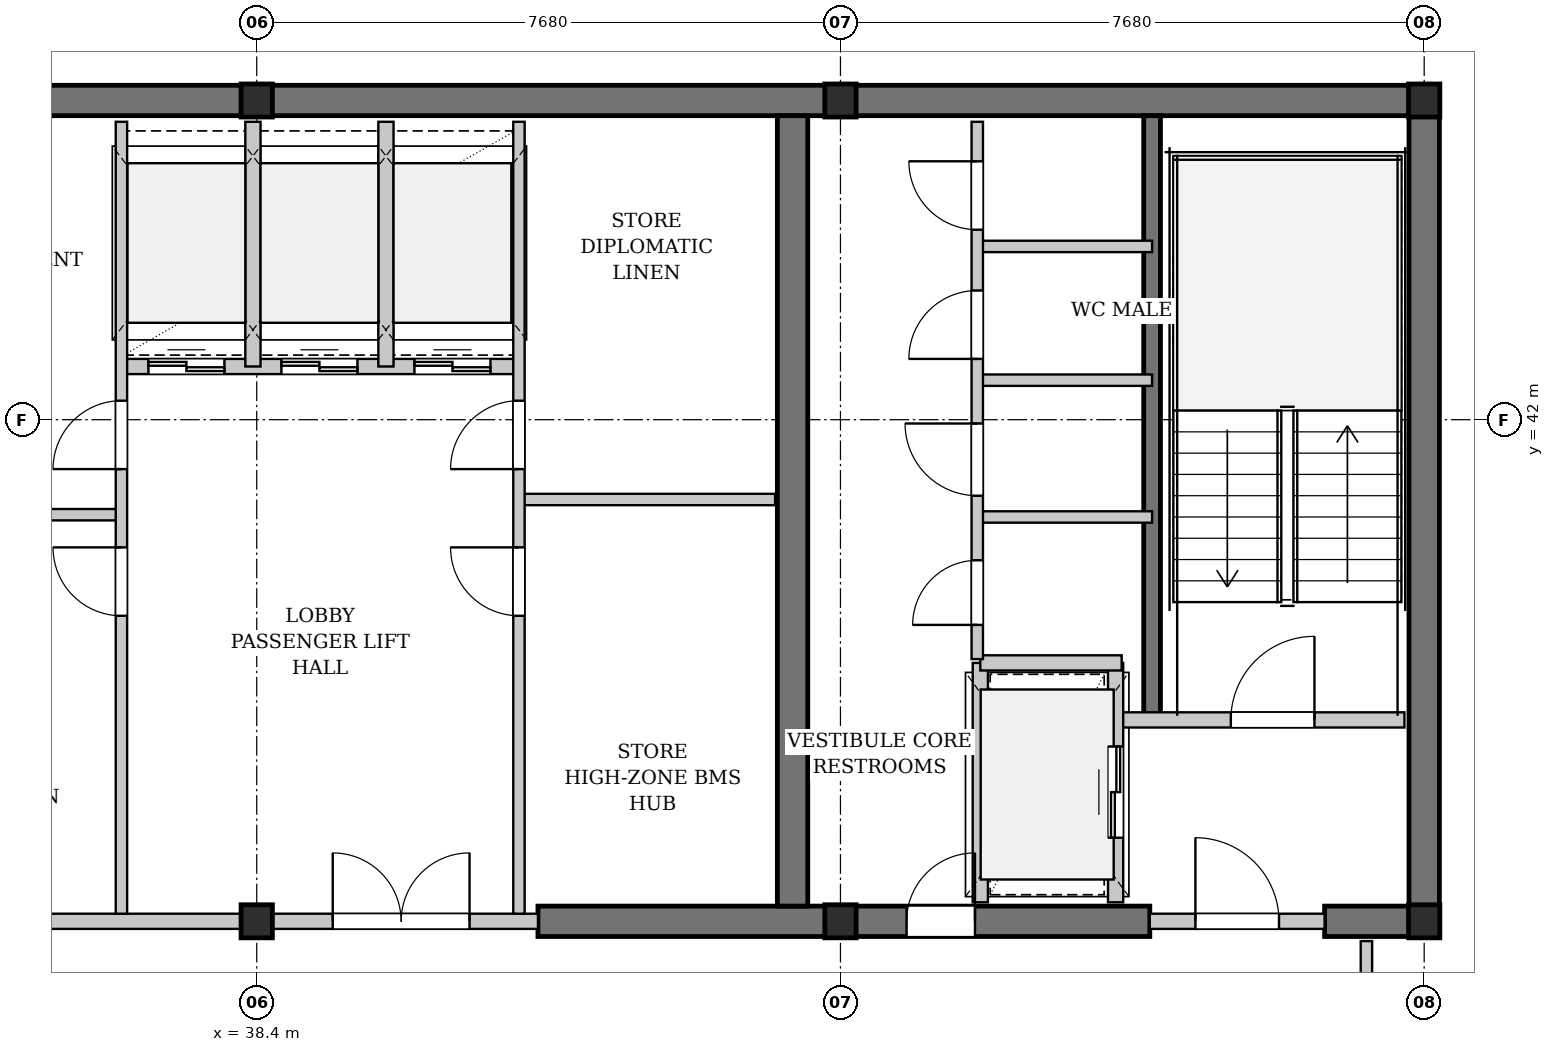
"""IFC4 building model, lengths in metres.
Left out: names, types, materials, properties, quantities, classifications, styles, units other than length and angle.
Written with IfcOpenShell. Run it as: python <this file> out.ifc"""

import sys

from ifc_helpers import new_model, si_unit, direction, frame, frame_2d, origin, origin_2d, place, context, subcontext, project, spatial, rectangle, i_section, extrude, element, fill, save


model = new_model("IFC4")
c1 = context("Model", 3, precision=1e-05, world=origin(), true_north=direction((0.0, 1.0)))
c2 = subcontext(c1, "Body", "Model", "MODEL_VIEW")
j1 = project(units=[si_unit("LENGTHUNIT", "METRE"), si_unit("PLANEANGLEUNIT", "RADIAN")], contexts=[c1])
p1 = place(None, origin())
s1 = spatial("IfcSite", under=j1, at=p1, CompositionType="ELEMENT")
p2 = place(p1, origin())
s2 = spatial("IfcBuilding", under=s1, at=p2, CompositionType="ELEMENT")
p3 = place(p2, frame((0.0, 0.0, 227.6)))
s3 = spatial("IfcBuildingStorey", under=s2, at=p3, CompositionType="ELEMENT", Elevation=227.6)
p4 = place(p3, frame((22.84, 46.2, 0.0), z_axis=(0.0, 0.0, 1.0), x_axis=(1.0, 0.0, 0.0)))
e1 = element("IfcWall", 1, at=p4, inside=s3, PredefinedType="SHEAR", context=c2, shape_type="SweptSolid", body=[
    extrude(rectangle(XDim=31.12, YDim=0.4, at=frame_2d((15.56, 0.0))), origin(), (0.0, 0.0, 1.0), 3.08),
])
p5 = place(p3, frame((42.1, 35.4, 0.0), z_axis=(0.0, 0.0, 1.0), x_axis=(1.0, 0.0, 0.0)))
e2 = element("IfcWall", 2, at=p5, inside=s3, PredefinedType="SHEAR", context=c2, shape_type="SweptSolid", body=[
    extrude(rectangle(XDim=8.05, YDim=0.4, at=frame_2d((4.025, 0.0))), origin(), (0.0, 0.0, 1.0), 3.08),
])
p6 = place(p5, frame((4.85, 0.0, 0.0)))
e3 = element("IfcOpeningElement", 3, at=p6, cuts=e2, PredefinedType="OPENING", context=c2, shape_type="SweptSolid", body=[
    extrude(rectangle(XDim=0.9, YDim=2.15, at=frame_2d((0.45, 1.075))), frame((0.0, 0.21, 0.0), z_axis=(0.0, -1.0, 0.0), x_axis=(1.0, 0.0, 0.0)), (0.0, 0.0, 1.0), 0.42),
])
p7 = place(p3, frame((52.45, 35.4, 0.0), z_axis=(0.0, 0.0, 1.0), x_axis=(1.0, 0.0, 0.0)))
e4 = element("IfcWall", 4, at=p7, inside=s3, PredefinedType="SHEAR", context=c2, shape_type="SweptSolid", body=[
    extrude(rectangle(XDim=1.51, YDim=0.4, at=frame_2d((0.755, 0.0))), origin(), (0.0, 0.0, 1.0), 3.08),
])
for number, where, z_axis, x_axis in (
    (5, (45.45, 35.6, 0.0), (0.0, 0.0, 1.0), (0.0, 1.0, 0.0)),
    (6, (53.76, 35.6, 0.0), (0.0, 0.0, 1.0), (0.0, 1.0, 0.0)),
):
    element("IfcWall", number, at=place(p3, frame(where, z_axis=z_axis, x_axis=x_axis)), inside=s3, PredefinedType="SHEAR", context=c2, shape_type="SweptSolid", body=[
        extrude(rectangle(XDim=10.4, YDim=0.4, at=frame_2d((5.2, 0.0))), origin(), (0.0, 0.0, 1.0), 3.08),
    ])
p8 = place(p3, frame((50.18, 38.05, 0.0), z_axis=(0.0, 0.0, 1.0), x_axis=(0.0, 1.0, 0.0)))
e7 = element("IfcWall", 7, at=p8, inside=s3, PredefinedType="SHEAR", context=c2, shape_type="SweptSolid", body=[
    extrude(rectangle(XDim=7.95, YDim=0.22, at=frame_2d((3.975, 0.0))), origin(), (0.0, 0.0, 1.0), 3.08),
])
for number, where, z_axis, x_axis in (
    (8, (38.4, 35.4, 0.0), (0.0, 0.0, 1.0), (1.0, 0.0, 0.0)),
    (9, (38.4, 46.2, 0.0), (0.0, 0.0, 1.0), (1.0, 0.0, 0.0)),
    (10, (46.08, 35.4, 0.0), (0.0, 0.0, 1.0), (1.0, 0.0, 0.0)),
    (11, (46.08, 46.2, 0.0), (0.0, 0.0, 1.0), (1.0, 0.0, 0.0)),
    (12, (53.76, 35.4, 0.0), (0.0, 0.0, 1.0), (1.0, 0.0, 0.0)),
    (13, (53.76, 46.2, 0.0), (0.0, 0.0, 1.0), (1.0, 0.0, 0.0)),
):
    element("IfcColumn", number, at=place(p3, frame(where, z_axis=z_axis, x_axis=x_axis)), inside=s3, PredefinedType="COLUMN", context=c2, shape_type="SweptSolid", body=[
        extrude(i_section(OverallWidth=0.412, OverallDepth=0.435, WebThickness=0.036, FlangeThickness=0.058, FilletRadius=0.015, at=origin_2d()), origin(), (0.0, 0.0, 1.0), 3.3),
    ])
p9 = place(p3, frame((35.6, 35.4, 0.0), z_axis=(0.0, 0.0, 1.0), x_axis=(1.0, 0.0, 0.0)))
e14 = element("IfcWall", 14, at=p9, inside=s3, PredefinedType="PARTITIONING", context=c2, shape_type="SweptSolid", body=[
    extrude(rectangle(XDim=6.5, YDim=0.2, at=frame_2d((3.25, 0.0))), origin(), (0.0, 0.0, 1.0), 2.313),
])
p10 = place(p9, frame((3.8, 0.0, 0.0)))
e15 = element("IfcOpeningElement", 15, at=p10, cuts=e14, PredefinedType="OPENING", context=c2, shape_type="SweptSolid", body=[
    extrude(rectangle(XDim=1.8, YDim=2.3, at=frame_2d((0.9, 1.15))), frame((0.0, 0.11, 0.0), z_axis=(0.0, -1.0, 0.0), x_axis=(1.0, 0.0, 0.0)), (0.0, 0.0, 1.0), 0.22),
])
p11 = place(p3, frame((36.6, 42.7, 0.0), z_axis=(0.0, 0.0, 1.0), x_axis=(1.0, 0.0, 0.0)))
e16 = element("IfcWall", 16, at=p11, inside=s3, PredefinedType="PARTITIONING", context=c2, shape_type="SweptSolid", body=[
    extrude(rectangle(XDim=5.25, YDim=0.2, at=frame_2d((2.625, 0.0))), origin(), (0.0, 0.0, 1.0), 3.08),
])
p12 = place(p11, frame((0.375, 0.0, 0.0)))
e17 = element("IfcOpeningElement", 17, at=p12, cuts=e16, PredefinedType="OPENING", context=c2, shape_type="SweptSolid", body=[
    extrude(rectangle(XDim=1.0, YDim=2.2, at=frame_2d((0.5, 1.1))), frame((0.0, 0.11, 0.0), z_axis=(0.0, -1.0, 0.0), x_axis=(1.0, 0.0, 0.0)), (0.0, 0.0, 1.0), 0.22),
])
p13 = place(p11, frame((2.125, 0.0, 0.0)))
e18 = element("IfcOpeningElement", 18, at=p13, cuts=e16, PredefinedType="OPENING", context=c2, shape_type="SweptSolid", body=[
    extrude(rectangle(XDim=1.0, YDim=2.2, at=frame_2d((0.5, 1.1))), frame((0.0, 0.11, 0.0), z_axis=(0.0, -1.0, 0.0), x_axis=(1.0, 0.0, 0.0)), (0.0, 0.0, 1.0), 0.22),
])
p14 = place(p11, frame((3.875, 0.0, 0.0)))
e19 = element("IfcOpeningElement", 19, at=p14, cuts=e16, PredefinedType="OPENING", context=c2, shape_type="SweptSolid", body=[
    extrude(rectangle(XDim=1.0, YDim=2.2, at=frame_2d((0.5, 1.1))), frame((0.0, 0.11, 0.0), z_axis=(0.0, -1.0, 0.0), x_axis=(1.0, 0.0, 0.0)), (0.0, 0.0, 1.0), 0.22),
])
p15 = place(p3, frame((38.35, 42.7, 0.0), z_axis=(0.0, 0.0, 1.0), x_axis=(0.0, 1.0, 0.0)))
e20 = element("IfcWall", 20, at=p15, inside=s3, PredefinedType="PARTITIONING", context=c2, shape_type="SweptSolid", body=[
    extrude(rectangle(XDim=3.22, YDim=0.2, at=frame_2d((1.61, 0.0))), origin(), (0.0, 0.0, 1.0), 2.313),
])
p16 = place(p3, frame((40.1, 42.7, 0.0), z_axis=(0.0, 0.0, 1.0), x_axis=(0.0, 1.0, 0.0)))
e21 = element("IfcWall", 21, at=p16, inside=s3, PredefinedType="PARTITIONING", context=c2, shape_type="SweptSolid", body=[
    extrude(rectangle(XDim=3.22, YDim=0.2, at=frame_2d((1.61, 0.0))), origin(), (0.0, 0.0, 1.0), 3.08),
])
p17 = place(p3, frame((33.05, 40.75, 0.0), z_axis=(0.0, 0.0, 1.0), x_axis=(1.0, 0.0, 0.0)))
e22 = element("IfcWall", 22, at=p17, inside=s3, PredefinedType="PARTITIONING", context=c2, shape_type="SweptSolid", body=[
    extrude(rectangle(XDim=3.57, YDim=0.15, at=frame_2d((1.785, 0.0))), origin(), (0.0, 0.0, 1.0), 3.08),
])
p18 = place(p3, frame((36.62, 35.5, 0.0), z_axis=(0.0, 0.0, 1.0), x_axis=(0.0, 1.0, 0.0)))
e23 = element("IfcWall", 23, at=p18, inside=s3, PredefinedType="PARTITIONING", context=c2, shape_type="SweptSolid", body=[
    extrude(rectangle(XDim=10.42, YDim=0.15, at=frame_2d((5.21, 0.0))), origin(), (0.0, 0.0, 1.0), 3.08),
])
p19 = place(p18, frame((3.92, 0.0, 0.0)))
e24 = element("IfcOpeningElement", 24, at=p19, cuts=e23, PredefinedType="OPENING", context=c2, shape_type="SweptSolid", body=[
    extrude(rectangle(XDim=0.9, YDim=2.15, at=frame_2d((0.45, 1.075))), frame((0.0, 0.085, 0.0), z_axis=(0.0, -1.0, 0.0), x_axis=(1.0, 0.0, 0.0)), (0.0, 0.0, 1.0), 0.17),
])
p20 = place(p18, frame((5.85, 0.0, 0.0)))
e25 = element("IfcOpeningElement", 25, at=p20, cuts=e23, PredefinedType="OPENING", context=c2, shape_type="SweptSolid", body=[
    extrude(rectangle(XDim=0.9, YDim=2.15, at=frame_2d((0.45, 1.075))), frame((0.0, 0.085, 0.0), z_axis=(0.0, -1.0, 0.0), x_axis=(1.0, 0.0, 0.0)), (0.0, 0.0, 1.0), 0.17),
])
p21 = place(p3, frame((41.85, 40.95, 0.0), z_axis=(0.0, 0.0, 1.0), x_axis=(1.0, 0.0, 0.0)))
e26 = element("IfcWall", 26, at=p21, inside=s3, PredefinedType="PARTITIONING", context=c2, shape_type="SweptSolid", body=[
    extrude(rectangle(XDim=3.37, YDim=0.15, at=frame_2d((1.685, 0.0))), origin(), (0.0, 0.0, 1.0), 3.08),
])
p22 = place(p3, frame((41.85, 35.5, 0.0), z_axis=(0.0, 0.0, 1.0), x_axis=(0.0, 1.0, 0.0)))
e27 = element("IfcWall", 27, at=p22, inside=s3, PredefinedType="PARTITIONING", context=c2, shape_type="SweptSolid", body=[
    extrude(rectangle(XDim=10.42, YDim=0.15, at=frame_2d((5.21, 0.0))), origin(), (0.0, 0.0, 1.0), 3.08),
])
p23 = place(p22, frame((3.92, 0.0, 0.0)))
e28 = element("IfcOpeningElement", 28, at=p23, cuts=e27, PredefinedType="OPENING", context=c2, shape_type="SweptSolid", body=[
    extrude(rectangle(XDim=0.9, YDim=2.15, at=frame_2d((0.45, 1.075))), frame((0.0, 0.085, 0.0), z_axis=(0.0, -1.0, 0.0), x_axis=(1.0, 0.0, 0.0)), (0.0, 0.0, 1.0), 0.17),
])
p24 = place(p22, frame((5.85, 0.0, 0.0)))
e29 = element("IfcOpeningElement", 29, at=p24, cuts=e27, PredefinedType="OPENING", context=c2, shape_type="SweptSolid", body=[
    extrude(rectangle(XDim=0.9, YDim=2.15, at=frame_2d((0.45, 1.075))), frame((0.0, 0.085, 0.0), z_axis=(0.0, -1.0, 0.0), x_axis=(1.0, 0.0, 0.0)), (0.0, 0.0, 1.0), 0.17),
])
p25 = place(p3, frame((49.78, 38.05, 0.0), z_axis=(0.0, 0.0, 1.0), x_axis=(1.0, 0.0, 0.0)))
e30 = element("IfcWall", 30, at=p25, inside=s3, PredefinedType="PARTITIONING", context=c2, shape_type="SweptSolid", body=[
    extrude(rectangle(XDim=3.72, YDim=0.2, at=frame_2d((1.86, 0.0))), origin(), (0.0, 0.0, 1.0), 3.08),
])
p26 = place(p25, frame((1.436, 0.0, 0.0)))
e31 = element("IfcOpeningElement", 31, at=p26, cuts=e30, PredefinedType="OPENING", context=c2, shape_type="SweptSolid", body=[
    extrude(rectangle(XDim=1.1, YDim=2.15, at=frame_2d((0.55, 1.075))), frame((0.0, 0.11, 0.0), z_axis=(0.0, -1.0, 0.0), x_axis=(1.0, 0.0, 0.0)), (0.0, 0.0, 1.0), 0.22),
])
p27 = place(p3, frame((50.15, 35.4, 0.0), z_axis=(0.0, 0.0, 1.0), x_axis=(1.0, 0.0, 0.0)))
e32 = element("IfcWall", 32, at=p27, inside=s3, PredefinedType="PARTITIONING", context=c2, shape_type="SweptSolid", body=[
    extrude(rectangle(XDim=2.3, YDim=0.2, at=frame_2d((1.15, 0.0))), origin(), (0.0, 0.0, 1.0), 2.313),
])
p28 = place(p27, frame((0.6, 0.0, 0.0)))
e33 = element("IfcOpeningElement", 33, at=p28, cuts=e32, PredefinedType="OPENING", context=c2, shape_type="SweptSolid", body=[
    extrude(rectangle(XDim=1.1, YDim=2.15, at=frame_2d((0.55, 1.075))), frame((0.0, 0.11, 0.0), z_axis=(0.0, -1.0, 0.0), x_axis=(1.0, 0.0, 0.0)), (0.0, 0.0, 1.0), 0.22),
])
p29 = place(p3, frame((49.7, 35.65, 0.0), z_axis=(0.0, 0.0, 1.0), x_axis=(0.0, 1.0, 0.0)))
e34 = element("IfcWall", 34, at=p29, inside=s3, PredefinedType="PARTITIONING", context=c2, shape_type="SweptSolid", body=[
    extrude(rectangle(XDim=3.15, YDim=0.2, at=frame_2d((1.575, 0.0))), origin(), (0.0, 0.0, 1.0), 3.08),
])
p30 = place(p29, frame((0.85, 0.0, 0.0)))
e35 = element("IfcOpeningElement", 35, at=p30, cuts=e34, PredefinedType="OPENING", context=c2, shape_type="SweptSolid", body=[
    extrude(rectangle(XDim=1.2, YDim=2.2, at=frame_2d((0.6, 1.1))), frame((0.0, 0.11, 0.0), z_axis=(0.0, -1.0, 0.0), x_axis=(1.0, 0.0, 0.0)), (0.0, 0.0, 1.0), 0.22),
])
p31 = place(p3, frame((47.92, 35.65, 0.0), z_axis=(0.0, 0.0, 1.0), x_axis=(0.0, 1.0, 0.0)))
e36 = element("IfcWall", 36, at=p31, inside=s3, PredefinedType="PARTITIONING", context=c2, shape_type="SweptSolid", body=[
    extrude(rectangle(XDim=3.15, YDim=0.2, at=frame_2d((1.575, 0.0))), origin(), (0.0, 0.0, 1.0), 3.08),
])
p32 = place(p3, frame((47.92, 38.8, 0.0), z_axis=(0.0, 0.0, 1.0), x_axis=(1.0, 0.0, 0.0)))
e37 = element("IfcWall", 37, at=p32, inside=s3, PredefinedType="PARTITIONING", context=c2, shape_type="SweptSolid", body=[
    extrude(rectangle(XDim=1.86, YDim=0.2, at=frame_2d((0.93, 0.0))), origin(), (0.0, 0.0, 1.0), 3.08),
])
for number, where, z_axis, x_axis in (
    (38, (47.88, 40.72, 0.0), (0.0, 0.0, 1.0), (1.0, 0.0, 0.0)),
    (39, (47.88, 42.52, 0.0), (0.0, 0.0, 1.0), (1.0, 0.0, 0.0)),
    (40, (47.88, 44.28, 0.0), (0.0, 0.0, 1.0), (1.0, 0.0, 0.0)),
):
    element("IfcWall", number, at=place(p3, frame(where, z_axis=z_axis, x_axis=x_axis)), inside=s3, PredefinedType="PARTITIONING", context=c2, shape_type="SweptSolid", body=[
        extrude(rectangle(XDim=2.3, YDim=0.15, at=frame_2d((1.15, 0.0))), origin(), (0.0, 0.0, 1.0), 3.08),
    ])
p33 = place(p3, frame((47.88, 38.85, 0.0), z_axis=(0.0, 0.0, 1.0), x_axis=(0.0, 1.0, 0.0)))
e41 = element("IfcWall", 41, at=p33, inside=s3, PredefinedType="PARTITIONING", context=c2, shape_type="SweptSolid", body=[
    extrude(rectangle(XDim=7.07, YDim=0.15, at=frame_2d((3.535, 0.0))), origin(), (0.0, 0.0, 1.0), 3.08),
])
p34 = place(p33, frame((0.45, 0.0, 0.0)))
e42 = element("IfcOpeningElement", 42, at=p34, cuts=e41, PredefinedType="OPENING", context=c2, shape_type="SweptSolid", body=[
    extrude(rectangle(XDim=0.85, YDim=2.15, at=frame_2d((0.425, 1.075))), frame((0.0, 0.085, 0.0), z_axis=(0.0, -1.0, 0.0), x_axis=(1.0, 0.0, 0.0)), (0.0, 0.0, 1.0), 0.17),
])
p35 = place(p33, frame((2.15, 0.0, 0.0)))
e43 = element("IfcOpeningElement", 43, at=p35, cuts=e41, PredefinedType="OPENING", context=c2, shape_type="SweptSolid", body=[
    extrude(rectangle(XDim=0.95, YDim=2.15, at=frame_2d((0.475, 1.075))), frame((0.0, 0.085, 0.0), z_axis=(0.0, -1.0, 0.0), x_axis=(1.0, 0.0, 0.0)), (0.0, 0.0, 1.0), 0.17),
])
p36 = place(p33, frame((3.95, 0.0, 0.0)))
e44 = element("IfcOpeningElement", 44, at=p36, cuts=e41, PredefinedType="OPENING", context=c2, shape_type="SweptSolid", body=[
    extrude(rectangle(XDim=0.9, YDim=2.15, at=frame_2d((0.45, 1.075))), frame((0.0, 0.085, 0.0), z_axis=(0.0, -1.0, 0.0), x_axis=(1.0, 0.0, 0.0)), (0.0, 0.0, 1.0), 0.17),
])
p37 = place(p33, frame((5.65, 0.0, 0.0)))
e45 = element("IfcOpeningElement", 45, at=p37, cuts=e41, PredefinedType="OPENING", context=c2, shape_type="SweptSolid", body=[
    extrude(rectangle(XDim=0.9, YDim=2.15, at=frame_2d((0.45, 1.075))), frame((0.0, 0.085, 0.0), z_axis=(0.0, -1.0, 0.0), x_axis=(1.0, 0.0, 0.0)), (0.0, 0.0, 1.0), 0.17),
])
p38 = place(p3, frame((53.0, 21.35, 0.0), z_axis=(0.0, 0.0, 1.0), x_axis=(0.0, 1.0, 0.0)))
e46 = element("IfcWall", 46, at=p38, inside=s3, PredefinedType="PARTITIONING", context=c2, shape_type="SweptSolid", body=[
    extrude(rectangle(XDim=13.79, YDim=0.15, at=frame_2d((6.895, 0.0))), origin(), (0.0, 0.0, 1.0), 3.08),
])
p39 = place(p38, frame((1.03, 0.0, 0.0)))
e47 = element("IfcOpeningElement", 47, at=p39, cuts=e46, PredefinedType="OPENING", context=c2, shape_type="SweptSolid", body=[
    extrude(rectangle(XDim=0.9, YDim=2.15, at=frame_2d((0.45, 1.075))), frame((0.0, 0.085, 0.0), z_axis=(0.0, -1.0, 0.0), x_axis=(1.0, 0.0, 0.0)), (0.0, 0.0, 1.0), 0.17),
])
p40 = place(p10, origin())
e48 = element("IfcDoor", 48, at=p40, inside=s3, OperationType="DOUBLE_DOOR_SINGLE_SWING", PredefinedType="DOOR", context=c2, shape_type="SweptSolid", body=[
    extrude(rectangle(XDim=1.8, YDim=2.3, at=frame_2d((0.9, 1.15))), frame((0.0, 0.025, 0.0), z_axis=(0.0, -1.0, 0.0), x_axis=(1.0, 0.0, 0.0)), (0.0, 0.0, 1.0), 0.05),
])
fill(e15, e48)
p41 = place(p12, origin())
e49 = element("IfcDoor", 49, at=p41, inside=s3, OperationType="DOUBLE_DOOR_SLIDING", PredefinedType="DOOR", context=c2, shape_type="SweptSolid", body=[
    extrude(rectangle(XDim=1.0, YDim=2.2, at=frame_2d((0.5, 1.1))), frame((0.0, 0.025, 0.0), z_axis=(0.0, -1.0, 0.0), x_axis=(1.0, 0.0, 0.0)), (0.0, 0.0, 1.0), 0.05),
])
fill(e17, e49)
p42 = place(p13, origin())
e50 = element("IfcDoor", 50, at=p42, inside=s3, OperationType="DOUBLE_DOOR_SLIDING", PredefinedType="DOOR", context=c2, shape_type="SweptSolid", body=[
    extrude(rectangle(XDim=1.0, YDim=2.2, at=frame_2d((0.5, 1.1))), frame((0.0, 0.025, 0.0), z_axis=(0.0, -1.0, 0.0), x_axis=(1.0, 0.0, 0.0)), (0.0, 0.0, 1.0), 0.05),
])
fill(e18, e50)
p43 = place(p14, origin())
e51 = element("IfcDoor", 51, at=p43, inside=s3, OperationType="DOUBLE_DOOR_SLIDING", PredefinedType="DOOR", context=c2, shape_type="SweptSolid", body=[
    extrude(rectangle(XDim=1.0, YDim=2.2, at=frame_2d((0.5, 1.1))), frame((0.0, 0.025, 0.0), z_axis=(0.0, -1.0, 0.0), x_axis=(1.0, 0.0, 0.0)), (0.0, 0.0, 1.0), 0.05),
])
fill(e19, e51)
p44 = place(p19, origin())
e52 = element("IfcDoor", 52, at=p44, inside=s3, OperationType="SINGLE_SWING_RIGHT", PredefinedType="DOOR", context=c2, shape_type="SweptSolid", body=[
    extrude(rectangle(XDim=0.9, YDim=2.15, at=frame_2d((0.45, 1.075))), frame((0.0, 0.025, 0.0), z_axis=(0.0, -1.0, 0.0), x_axis=(1.0, 0.0, 0.0)), (0.0, 0.0, 1.0), 0.05),
])
fill(e24, e52)
p45 = place(p20, origin())
e53 = element("IfcDoor", 53, at=p45, inside=s3, OperationType="SINGLE_SWING_LEFT", PredefinedType="DOOR", context=c2, shape_type="SweptSolid", body=[
    extrude(rectangle(XDim=0.9, YDim=2.15, at=frame_2d((0.45, 1.075))), frame((0.0, 0.025, 0.0), z_axis=(0.0, -1.0, 0.0), x_axis=(1.0, 0.0, 0.0)), (0.0, 0.0, 1.0), 0.05),
])
fill(e25, e53)
p46 = place(p23, origin())
e54 = element("IfcDoor", 54, at=p46, inside=s3, OperationType="SINGLE_SWING_RIGHT", PredefinedType="DOOR", context=c2, shape_type="SweptSolid", body=[
    extrude(rectangle(XDim=0.9, YDim=2.15, at=frame_2d((0.45, 1.075))), frame((0.0, 0.025, 0.0), z_axis=(0.0, -1.0, 0.0), x_axis=(1.0, 0.0, 0.0)), (0.0, 0.0, 1.0), 0.05),
])
fill(e28, e54)
p47 = place(p24, origin())
e55 = element("IfcDoor", 55, at=p47, inside=s3, OperationType="SINGLE_SWING_LEFT", PredefinedType="DOOR", context=c2, shape_type="SweptSolid", body=[
    extrude(rectangle(XDim=0.9, YDim=2.15, at=frame_2d((0.45, 1.075))), frame((0.0, 0.025, 0.0), z_axis=(0.0, -1.0, 0.0), x_axis=(1.0, 0.0, 0.0)), (0.0, 0.0, 1.0), 0.05),
])
fill(e29, e55)
p48 = place(p26, origin())
e56 = element("IfcDoor", 56, at=p48, inside=s3, OperationType="SINGLE_SWING_RIGHT", PredefinedType="DOOR", context=c2, shape_type="SweptSolid", body=[
    extrude(rectangle(XDim=1.1, YDim=2.15, at=frame_2d((0.55, 1.075))), frame((0.0, 0.025, 0.0), z_axis=(0.0, -1.0, 0.0), x_axis=(1.0, 0.0, 0.0)), (0.0, 0.0, 1.0), 0.05),
])
fill(e31, e56)
p49 = place(p28, origin())
e57 = element("IfcDoor", 57, at=p49, inside=s3, OperationType="SINGLE_SWING_LEFT", PredefinedType="DOOR", context=c2, shape_type="SweptSolid", body=[
    extrude(rectangle(XDim=1.1, YDim=2.15, at=frame_2d((0.55, 1.075))), frame((0.0, 0.025, 0.0), z_axis=(0.0, -1.0, 0.0), x_axis=(1.0, 0.0, 0.0)), (0.0, 0.0, 1.0), 0.05),
])
fill(e33, e57)
p50 = place(p30, origin())
e58 = element("IfcDoor", 58, at=p50, inside=s3, OperationType="DOUBLE_DOOR_SLIDING", PredefinedType="DOOR", context=c2, shape_type="SweptSolid", body=[
    extrude(rectangle(XDim=1.2, YDim=2.2, at=frame_2d((0.6, 1.1))), frame((0.0, 0.025, 0.0), z_axis=(0.0, -1.0, 0.0), x_axis=(1.0, 0.0, 0.0)), (0.0, 0.0, 1.0), 0.05),
])
fill(e35, e58)
p51 = place(p34, origin())
e59 = element("IfcDoor", 59, at=p51, inside=s3, OperationType="SINGLE_SWING_LEFT", PredefinedType="DOOR", context=c2, shape_type="SweptSolid", body=[
    extrude(rectangle(XDim=0.85, YDim=2.15, at=frame_2d((0.425, 1.075))), frame((0.0, 0.025, 0.0), z_axis=(0.0, -1.0, 0.0), x_axis=(1.0, 0.0, 0.0)), (0.0, 0.0, 1.0), 0.05),
])
fill(e42, e59)
p52 = place(p35, origin())
e60 = element("IfcDoor", 60, at=p52, inside=s3, OperationType="SINGLE_SWING_RIGHT", PredefinedType="DOOR", context=c2, shape_type="SweptSolid", body=[
    extrude(rectangle(XDim=0.95, YDim=2.15, at=frame_2d((0.475, 1.075))), frame((0.0, 0.025, 0.0), z_axis=(0.0, -1.0, 0.0), x_axis=(1.0, 0.0, 0.0)), (0.0, 0.0, 1.0), 0.05),
])
fill(e43, e60)
p53 = place(p36, origin())
e61 = element("IfcDoor", 61, at=p53, inside=s3, OperationType="SINGLE_SWING_LEFT", PredefinedType="DOOR", context=c2, shape_type="SweptSolid", body=[
    extrude(rectangle(XDim=0.9, YDim=2.15, at=frame_2d((0.45, 1.075))), frame((0.0, 0.025, 0.0), z_axis=(0.0, -1.0, 0.0), x_axis=(1.0, 0.0, 0.0)), (0.0, 0.0, 1.0), 0.05),
])
fill(e44, e61)
p54 = place(p37, origin())
e62 = element("IfcDoor", 62, at=p54, inside=s3, OperationType="SINGLE_SWING_RIGHT", PredefinedType="DOOR", context=c2, shape_type="SweptSolid", body=[
    extrude(rectangle(XDim=0.9, YDim=2.15, at=frame_2d((0.45, 1.075))), frame((0.0, 0.025, 0.0), z_axis=(0.0, -1.0, 0.0), x_axis=(1.0, 0.0, 0.0)), (0.0, 0.0, 1.0), 0.05),
])
fill(e45, e62)
p55 = place(p6, origin())
e63 = element("IfcDoor", 63, at=p55, inside=s3, OperationType="SINGLE_SWING_RIGHT", PredefinedType="DOOR", context=c2, shape_type="SweptSolid", body=[
    extrude(rectangle(XDim=0.9, YDim=2.15, at=frame_2d((0.45, 1.075))), frame((0.0, 0.025, 0.0), z_axis=(0.0, -1.0, 0.0), x_axis=(1.0, 0.0, 0.0)), (0.0, 0.0, 1.0), 0.05),
])
fill(e3, e63)
save(model, sys.argv[1])
